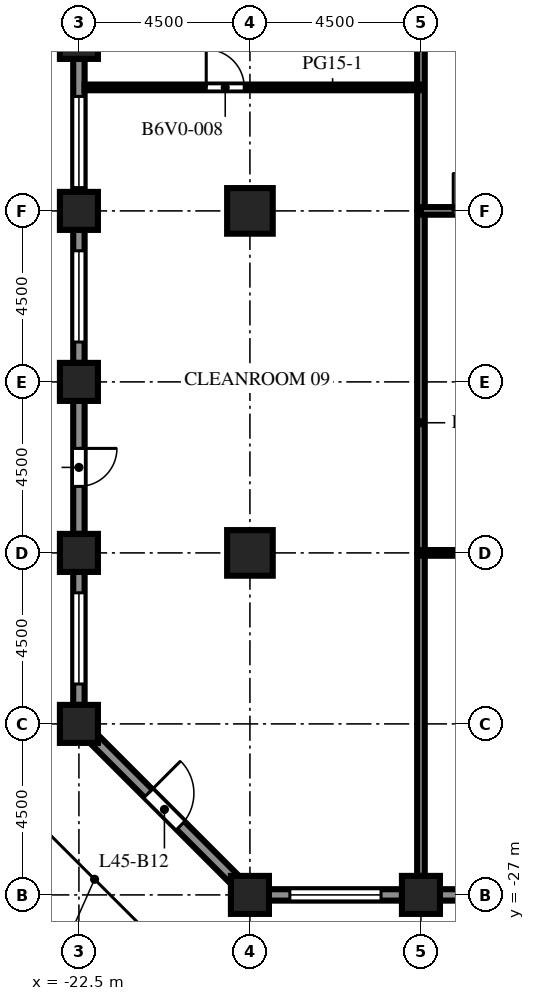
"""IFC4 building model, lengths in metres.
Left out: names, types, materials, properties, quantities, classifications, styles, units other than length and angle.
Written with IfcOpenShell. Run it as: python <this file> out.ifc"""

import sys

from ifc_helpers import new_model, si_unit, direction, frame, frame_2d, origin, origin_2d, place, context, subcontext, project, spatial, rectangle, extrude, element, fill, save


model = new_model("IFC4")
c1 = context("Model", 3, precision=1e-05, world=origin(), true_north=direction((0.0, 1.0)))
c2 = subcontext(c1, "Body", "Model", "MODEL_VIEW")
j1 = project(units=[si_unit("LENGTHUNIT", "METRE"), si_unit("PLANEANGLEUNIT", "RADIAN")], contexts=[c1])
p1 = place(None, origin())
s1 = spatial("IfcSite", under=j1, at=p1, CompositionType="ELEMENT")
p2 = place(p1, origin())
s2 = spatial("IfcBuilding", under=s1, at=p2, CompositionType="ELEMENT")
p3 = place(p2, frame((0.0, 0.0, 199.7)))
s3 = spatial("IfcBuildingStorey", under=s2, at=p3, CompositionType="ELEMENT", Elevation=199.7)
for number, where, z_axis, x_axis in (
    (1, (-22.5, -22.5, 0.0), (0.0, 0.0, 1.0), (1.0, 0.0, 0.0)),
    (2, (-22.5, -18.0, 0.0), (0.0, 0.0, 1.0), (1.0, 0.0, 0.0)),
    (3, (-22.5, -13.5, 0.0), (0.0, 0.0, 1.0), (1.0, 0.0, 0.0)),
    (4, (-22.5, -9.0, 0.0), (0.0, 0.0, 1.0), (1.0, 0.0, 0.0)),
    (5, (-22.5, -4.5, 0.0), (0.0, 0.0, 1.0), (1.0, 0.0, 0.0)),
    (6, (-18.0, -27.0, 0.0), (0.0, 0.0, 1.0), (1.0, 0.0, 0.0)),
    (7, (-13.5, -27.0, 0.0), (0.0, 0.0, 1.0), (1.0, 0.0, 0.0)),
):
    element("IfcColumn", number, at=place(p3, frame(where, z_axis=z_axis, x_axis=x_axis)), inside=s3, PredefinedType="COLUMN", context=c2, shape_type="SweptSolid", body=[
        extrude(rectangle(XDim=1.0, YDim=1.0, at=origin_2d()), origin(), (0.0, 0.0, 1.0), 4.1),
    ])
for number, where, z_axis, x_axis in (
    (8, (-18.0, -18.0, 0.0), (0.0, 0.0, 1.0), (1.0, 0.0, 0.0)),
    (9, (-18.0, -9.0, 0.0), (0.0, 0.0, 1.0), (1.0, 0.0, 0.0)),
):
    element("IfcColumn", number, at=place(p3, frame(where, z_axis=z_axis, x_axis=x_axis)), inside=s3, PredefinedType="COLUMN", context=c2, shape_type="SweptSolid", body=[
        extrude(rectangle(XDim=1.2, YDim=1.2, at=origin_2d()), origin(), (0.0, 0.0, 1.0), 4.1),
    ])
p4 = place(p3, frame((-14.0, -27.0, 0.0), z_axis=(0.0, 0.0, 1.0), x_axis=(-1.0, 0.0, 0.0)))
e10 = element("IfcWall", 10, at=p4, inside=s3, PredefinedType="SOLIDWALL", context=c2, shape_type="SweptSolid", body=[
    extrude(rectangle(XDim=3.5, YDim=0.3, at=frame_2d((1.75, 0.0))), origin(), (0.0, 0.0, 1.0), 2.85),
])
p5 = place(p4, frame((0.55, 0.0, 0.8)))
e11 = element("IfcOpeningElement", 11, at=p5, cuts=e10, PredefinedType="OPENING", context=c2, shape_type="SweptSolid", body=[
    extrude(rectangle(XDim=2.4, YDim=1.7, at=frame_2d((1.2, 0.85))), frame((0.0, 0.16, 0.0), z_axis=(0.0, -1.0, 0.0), x_axis=(1.0, 0.0, 0.0)), (0.0, 0.0, 1.0), 0.32),
])
p6 = place(p3, frame((-9.5, -27.0, 0.0), z_axis=(0.0, 0.0, 1.0), x_axis=(-1.0, 0.0, 0.0)))
e12 = element("IfcWall", 12, at=p6, inside=s3, PredefinedType="SOLIDWALL", context=c2, shape_type="SweptSolid", body=[
    extrude(rectangle(XDim=3.5, YDim=0.3, at=frame_2d((1.75, 0.0))), origin(), (0.0, 0.0, 1.0), 2.85),
])
p7 = place(p6, frame((1.25, 0.0, 0.0)))
e13 = element("IfcOpeningElement", 13, at=p7, cuts=e12, PredefinedType="OPENING", context=c2, shape_type="SweptSolid", body=[
    extrude(rectangle(XDim=1.0, YDim=2.2, at=frame_2d((0.5, 1.1))), frame((0.0, 0.16, 0.0), z_axis=(0.0, -1.0, 0.0), x_axis=(1.0, 0.0, 0.0)), (0.0, 0.0, 1.0), 0.32),
])
p8 = place(p3, frame((-22.5, -8.5, 0.0), z_axis=(0.0, 0.0, 1.0), x_axis=(0.0, 1.0, 0.0)))
e14 = element("IfcWall", 14, at=p8, inside=s3, PredefinedType="SOLIDWALL", context=c2, shape_type="SweptSolid", body=[
    extrude(rectangle(XDim=3.5, YDim=0.3, at=frame_2d((1.75, 0.0))), origin(), (0.0, 0.0, 1.0), 2.85),
])
p9 = place(p8, frame((0.113, 0.0, 0.8)))
e15 = element("IfcOpeningElement", 15, at=p9, cuts=e14, PredefinedType="OPENING", context=c2, shape_type="SweptSolid", body=[
    extrude(rectangle(XDim=2.4, YDim=1.7, at=frame_2d((1.2, 0.85))), frame((0.0, 0.16, 0.0), z_axis=(0.0, -1.0, 0.0), x_axis=(1.0, 0.0, 0.0)), (0.0, 0.0, 1.0), 0.32),
])
p10 = place(p3, frame((-22.5, -13.0, 0.0), z_axis=(0.0, 0.0, 1.0), x_axis=(0.0, 1.0, 0.0)))
e16 = element("IfcWall", 16, at=p10, inside=s3, PredefinedType="SOLIDWALL", context=c2, shape_type="SweptSolid", body=[
    extrude(rectangle(XDim=3.5, YDim=0.3, at=frame_2d((1.75, 0.0))), origin(), (0.0, 0.0, 1.0), 2.85),
])
p11 = place(p10, frame((0.55, 0.0, 0.8)))
e17 = element("IfcOpeningElement", 17, at=p11, cuts=e16, PredefinedType="OPENING", context=c2, shape_type="SweptSolid", body=[
    extrude(rectangle(XDim=2.4, YDim=1.7, at=frame_2d((1.2, 0.85))), frame((0.0, 0.16, 0.0), z_axis=(0.0, -1.0, 0.0), x_axis=(1.0, 0.0, 0.0)), (0.0, 0.0, 1.0), 0.32),
])
p12 = place(p3, frame((-22.5, -17.5, 0.0), z_axis=(0.0, 0.0, 1.0), x_axis=(0.0, 1.0, 0.0)))
e18 = element("IfcWall", 18, at=p12, inside=s3, PredefinedType="SOLIDWALL", context=c2, shape_type="SweptSolid", body=[
    extrude(rectangle(XDim=3.5, YDim=0.3, at=frame_2d((1.75, 0.0))), origin(), (0.0, 0.0, 1.0), 2.85),
])
p13 = place(p12, frame((1.25, 0.0, 0.0)))
e19 = element("IfcOpeningElement", 19, at=p13, cuts=e18, PredefinedType="OPENING", context=c2, shape_type="SweptSolid", body=[
    extrude(rectangle(XDim=1.0, YDim=2.2, at=frame_2d((0.5, 1.1))), frame((0.0, 0.16, 0.0), z_axis=(0.0, -1.0, 0.0), x_axis=(1.0, 0.0, 0.0)), (0.0, 0.0, 1.0), 0.32),
])
p14 = place(p3, frame((-22.5, -22.0, 0.0), z_axis=(0.0, 0.0, 1.0), x_axis=(0.0, 1.0, 0.0)))
e20 = element("IfcWall", 20, at=p14, inside=s3, PredefinedType="SOLIDWALL", context=c2, shape_type="SweptSolid", body=[
    extrude(rectangle(XDim=3.5, YDim=0.3, at=frame_2d((1.75, 0.0))), origin(), (0.0, 0.0, 1.0), 2.85),
])
p15 = place(p14, frame((0.55, 0.0, 0.8)))
e21 = element("IfcOpeningElement", 21, at=p15, cuts=e20, PredefinedType="OPENING", context=c2, shape_type="SweptSolid", body=[
    extrude(rectangle(XDim=2.4, YDim=1.7, at=frame_2d((1.2, 0.85))), frame((0.0, 0.16, 0.0), z_axis=(0.0, -1.0, 0.0), x_axis=(1.0, 0.0, 0.0)), (0.0, 0.0, 1.0), 0.32),
])
p16 = place(p3, frame((-18.394, -26.606, 0.0), z_axis=(0.0, 0.0, 1.0), x_axis=(-0.707106781187, 0.707106781187, 0.0)))
e22 = element("IfcWall", 22, at=p16, inside=s3, PredefinedType="SOLIDWALL", context=c2, shape_type="SweptSolid", body=[
    extrude(rectangle(XDim=5.25, YDim=0.3, at=frame_2d((2.625, 0.0))), origin(), (0.0, 0.0, 1.0), 2.85),
])
p17 = place(p16, frame((2.025, 0.0, 0.0)))
e23 = element("IfcOpeningElement", 23, at=p17, cuts=e22, PredefinedType="OPENING", context=c2, shape_type="SweptSolid", body=[
    extrude(rectangle(XDim=1.2, YDim=2.2, at=frame_2d((0.6, 1.1))), frame((0.0, 0.16, 0.0), z_axis=(0.0, -1.0, 0.0), x_axis=(1.0, 0.0, 0.0)), (0.0, 0.0, 1.0), 0.32),
])
p18 = place(p3, frame((-13.5, -26.5, 0.0), z_axis=(0.0, 0.0, 1.0), x_axis=(0.0, 1.0, 0.0)))
e24 = element("IfcWall", 24, at=p18, inside=s3, PredefinedType="PARTITIONING", context=c2, shape_type="SweptSolid", body=[
    extrude(rectangle(XDim=29.75, YDim=0.2, at=frame_2d((14.875, 0.0))), origin(), (0.0, 0.0, 1.0), 3.65),
])
p19 = place(p18, frame((23.85, 0.0, 0.0)))
e25 = element("IfcOpeningElement", 25, at=p19, cuts=e24, PredefinedType="OPENING", context=c2, shape_type="SweptSolid", body=[
    extrude(rectangle(XDim=1.0, YDim=2.1, at=frame_2d((0.5, 1.05))), frame((0.0, 0.11, 0.0), z_axis=(0.0, -1.0, 0.0), x_axis=(1.0, 0.0, 0.0)), (0.0, 0.0, 1.0), 0.22),
])
p20 = place(p3, frame((-13.5, -18.0, 0.0), z_axis=(0.0, 0.0, 1.0), x_axis=(1.0, 0.0, 0.0)))
e26 = element("IfcWall", 26, at=p20, inside=s3, PredefinedType="PARTITIONING", context=c2, shape_type="SweptSolid", body=[
    extrude(rectangle(XDim=3.9, YDim=0.15, at=frame_2d((1.95, 0.0))), origin(), (0.0, 0.0, 1.0), 3.65),
])
p21 = place(p3, frame((-10.5, -9.0, 0.0), z_axis=(0.0, 0.0, 1.0), x_axis=(-1.0, 0.0, 0.0)))
e27 = element("IfcWall", 27, at=p21, inside=s3, PredefinedType="PARTITIONING", context=c2, shape_type="SweptSolid", body=[
    extrude(rectangle(XDim=3.0, YDim=0.2, at=frame_2d((1.5, 0.0))), origin(), (0.0, 0.0, 1.0), 3.65),
])
p22 = place(p21, frame((1.15, 0.0, 0.0)))
e28 = element("IfcOpeningElement", 28, at=p22, cuts=e27, PredefinedType="OPENING", context=c2, shape_type="SweptSolid", body=[
    extrude(rectangle(XDim=1.0, YDim=2.1, at=frame_2d((0.5, 1.05))), frame((0.0, 0.11, 0.0), z_axis=(0.0, -1.0, 0.0), x_axis=(1.0, 0.0, 0.0)), (0.0, 0.0, 1.0), 0.22),
])
p23 = place(p3, frame((-13.5, -5.75, 0.0), z_axis=(0.0, 0.0, 1.0), x_axis=(-1.0, 0.0, 0.0)))
e29 = element("IfcWall", 29, at=p23, inside=s3, PredefinedType="PARTITIONING", context=c2, shape_type="SweptSolid", body=[
    extrude(rectangle(XDim=8.85, YDim=0.15, at=frame_2d((4.425, 0.0))), origin(), (0.0, 0.0, 1.0), 3.65),
])
p24 = place(p23, frame((4.65, 0.0, 0.0)))
e30 = element("IfcOpeningElement", 30, at=p24, cuts=e29, PredefinedType="OPENING", context=c2, shape_type="SweptSolid", body=[
    extrude(rectangle(XDim=1.0, YDim=2.1, at=frame_2d((0.5, 1.05))), frame((0.0, 0.085, 0.0), z_axis=(0.0, -1.0, 0.0), x_axis=(1.0, 0.0, 0.0)), (0.0, 0.0, 1.0), 0.17),
])
p25 = place(p5, origin())
e31 = element("IfcWindow", 31, at=p25, inside=s3, PartitioningType="SINGLE_PANEL", PredefinedType="WINDOW", context=c2, shape_type="SweptSolid", body=[
    extrude(rectangle(XDim=2.4, YDim=1.7, at=frame_2d((1.2, 0.85))), frame((0.0, 0.03, 0.0), z_axis=(0.0, -1.0, 0.0), x_axis=(1.0, 0.0, 0.0)), (0.0, 0.0, 1.0), 0.06),
])
fill(e11, e31)
p26 = place(p9, origin())
e32 = element("IfcWindow", 32, at=p26, inside=s3, PartitioningType="SINGLE_PANEL", PredefinedType="WINDOW", context=c2, shape_type="SweptSolid", body=[
    extrude(rectangle(XDim=2.4, YDim=1.7, at=frame_2d((1.2, 0.85))), frame((0.0, 0.03, 0.0), z_axis=(0.0, -1.0, 0.0), x_axis=(1.0, 0.0, 0.0)), (0.0, 0.0, 1.0), 0.06),
])
fill(e15, e32)
p27 = place(p11, origin())
e33 = element("IfcWindow", 33, at=p27, inside=s3, PartitioningType="SINGLE_PANEL", PredefinedType="WINDOW", context=c2, shape_type="SweptSolid", body=[
    extrude(rectangle(XDim=2.4, YDim=1.7, at=frame_2d((1.2, 0.85))), frame((0.0, 0.03, 0.0), z_axis=(0.0, -1.0, 0.0), x_axis=(1.0, 0.0, 0.0)), (0.0, 0.0, 1.0), 0.06),
])
fill(e17, e33)
p28 = place(p13, origin())
e34 = element("IfcDoor", 34, at=p28, inside=s3, OperationType="SINGLE_SWING_RIGHT", PredefinedType="DOOR", context=c2, shape_type="SweptSolid", body=[
    extrude(rectangle(XDim=1.0, YDim=2.2, at=frame_2d((0.5, 1.1))), frame((0.0, 0.025, 0.0), z_axis=(0.0, -1.0, 0.0), x_axis=(1.0, 0.0, 0.0)), (0.0, 0.0, 1.0), 0.05),
])
fill(e19, e34)
p29 = place(p15, origin())
e35 = element("IfcWindow", 35, at=p29, inside=s3, PartitioningType="SINGLE_PANEL", PredefinedType="WINDOW", context=c2, shape_type="SweptSolid", body=[
    extrude(rectangle(XDim=2.4, YDim=1.7, at=frame_2d((1.2, 0.85))), frame((0.0, 0.03, 0.0), z_axis=(0.0, -1.0, 0.0), x_axis=(1.0, 0.0, 0.0)), (0.0, 0.0, 1.0), 0.06),
])
fill(e21, e35)
p30 = place(p17, origin())
e36 = element("IfcDoor", 36, at=p30, inside=s3, OperationType="SINGLE_SWING_RIGHT", PredefinedType="DOOR", context=c2, shape_type="SweptSolid", body=[
    extrude(rectangle(XDim=1.2, YDim=2.2, at=frame_2d((0.6, 1.1))), frame((0.0, 0.025, 0.0), z_axis=(0.0, -1.0, 0.0), x_axis=(1.0, 0.0, 0.0)), (0.0, 0.0, 1.0), 0.05),
])
fill(e23, e36)
p31 = place(p22, origin())
e37 = element("IfcDoor", 37, at=p31, inside=s3, OperationType="SINGLE_SWING_RIGHT", PredefinedType="DOOR", context=c2, shape_type="SweptSolid", body=[
    extrude(rectangle(XDim=1.0, YDim=2.1, at=frame_2d((0.5, 1.05))), frame((0.0, 0.025, 0.0), z_axis=(0.0, -1.0, 0.0), x_axis=(1.0, 0.0, 0.0)), (0.0, 0.0, 1.0), 0.05),
])
fill(e28, e37)
p32 = place(p24, origin())
e38 = element("IfcDoor", 38, at=p32, inside=s3, OperationType="SINGLE_SWING_RIGHT", PredefinedType="DOOR", context=c2, shape_type="SweptSolid", body=[
    extrude(rectangle(XDim=1.0, YDim=2.1, at=frame_2d((0.5, 1.05))), frame((0.0, 0.025, 0.0), z_axis=(0.0, -1.0, 0.0), x_axis=(1.0, 0.0, 0.0)), (0.0, 0.0, 1.0), 0.05),
])
fill(e30, e38)
save(model, sys.argv[1])
